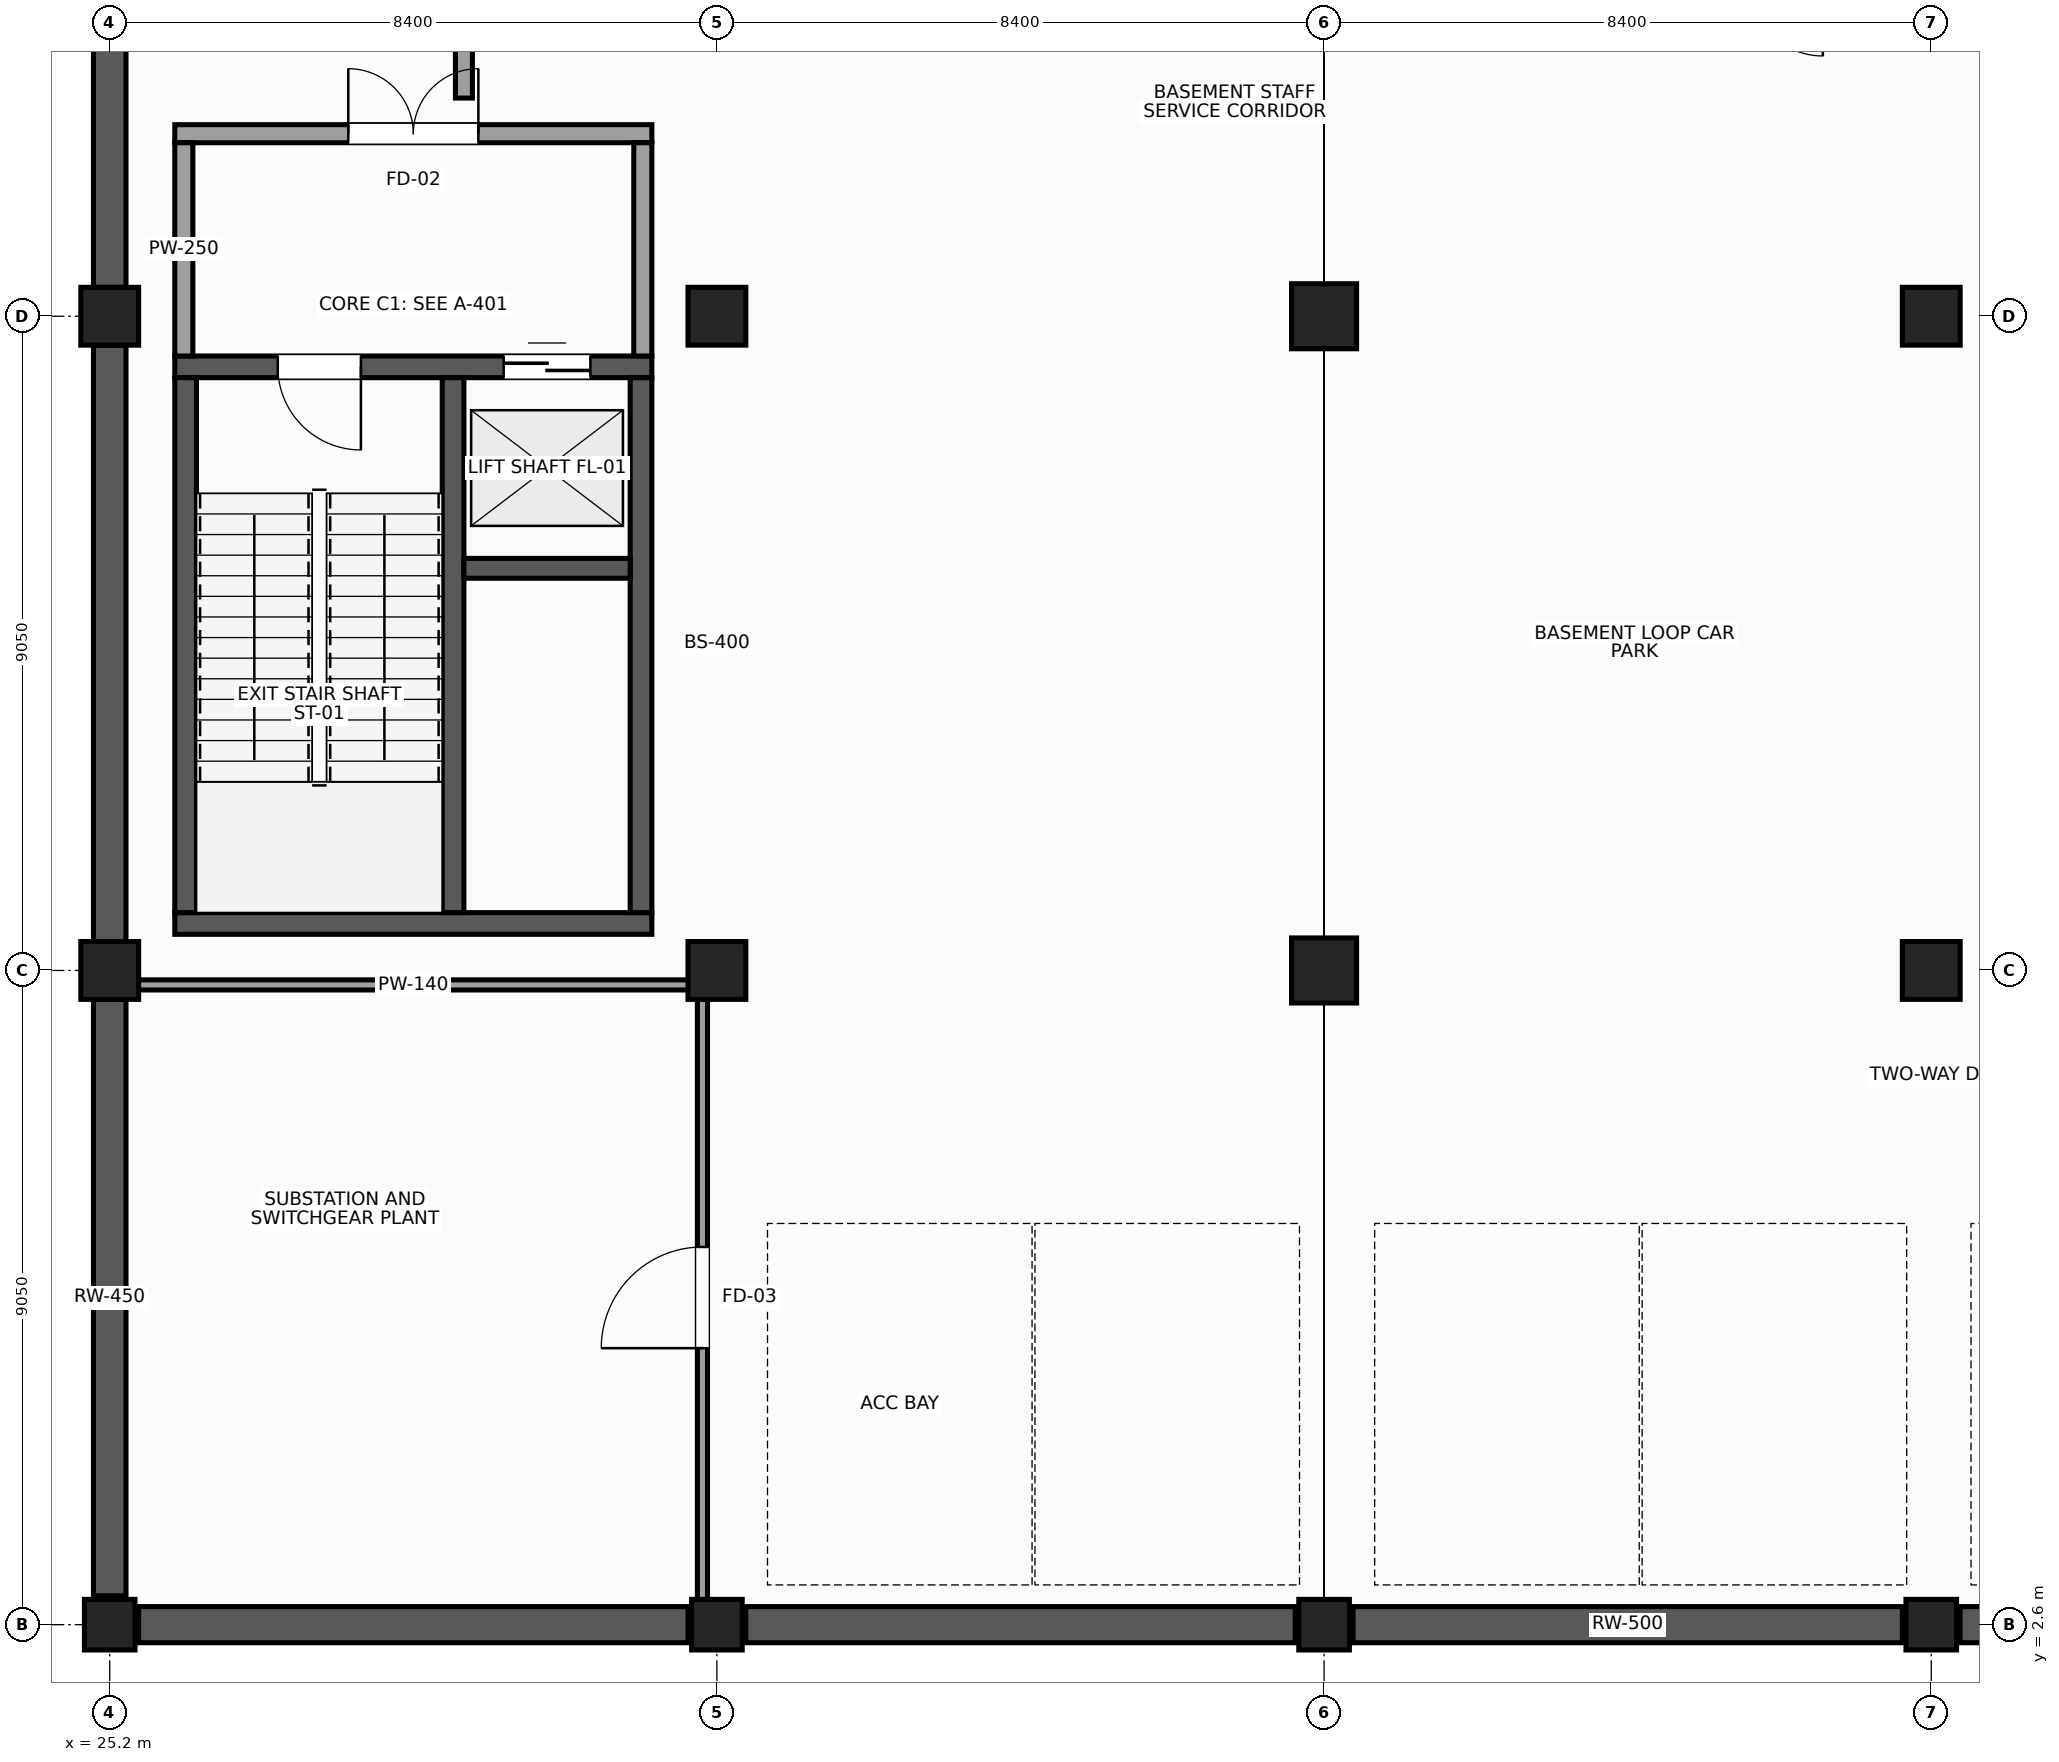
"""IFC4 building model, lengths in metres.
Left out: names, types, materials, properties, quantities, classifications, styles, units other than length and angle.
Written with IfcOpenShell. Run it as: python <this file> out.ifc"""

import sys

from ifc_helpers import new_model, si_unit, direction, frame, frame_2d, origin, origin_2d, place, context, subcontext, project, spatial, rectangle, extrude, element, fill, save


model = new_model("IFC4")
c1 = context("Model", 3, precision=1e-05, world=origin(), true_north=direction((0.0, 1.0)))
c2 = subcontext(c1, "Body", "Model", "MODEL_VIEW")
j1 = project(units=[si_unit("LENGTHUNIT", "METRE"), si_unit("PLANEANGLEUNIT", "RADIAN")], contexts=[c1])
p1 = place(None, origin())
s1 = spatial("IfcSite", under=j1, at=p1, CompositionType="ELEMENT")
p2 = place(p1, origin())
s2 = spatial("IfcBuilding", under=s1, at=p2, CompositionType="ELEMENT")
p3 = place(p2, frame((0.0, 0.0, -5.4)))
s3 = spatial("IfcBuildingStorey", under=s2, at=p3, CompositionType="ELEMENT", Elevation=-5.4)
p4 = place(p3, frame((25.2, 2.6, -0.4), z_axis=(0.0, 0.0, 1.0), x_axis=(1.0, 0.0, 0.0)))
e1 = element("IfcColumn", 1, at=p4, inside=s3, PredefinedType="COLUMN", context=c2, shape_type="SweptSolid", body=[
    extrude(rectangle(XDim=0.7, YDim=0.7, at=origin_2d()), origin(), (0.0, 0.0, 1.0), 5.8),
])
for number, where, z_axis, x_axis in (
    (2, (25.2, 11.65, -0.4), (0.0, 0.0, 1.0), (1.0, 0.0, 0.0)),
    (3, (25.2, 20.7, -0.4), (0.0, 0.0, 1.0), (1.0, 0.0, 0.0)),
):
    element("IfcColumn", number, at=place(p3, frame(where, z_axis=z_axis, x_axis=x_axis)), inside=s3, PredefinedType="COLUMN", context=c2, shape_type="SweptSolid", body=[
        extrude(rectangle(XDim=0.8, YDim=0.8, at=origin_2d()), origin(), (0.0, 0.0, 1.0), 5.8),
    ])
p5 = place(p3, frame((33.6, 2.6, -0.4), z_axis=(0.0, 0.0, 1.0), x_axis=(1.0, 0.0, 0.0)))
e4 = element("IfcColumn", 4, at=p5, inside=s3, PredefinedType="COLUMN", context=c2, shape_type="SweptSolid", body=[
    extrude(rectangle(XDim=0.7, YDim=0.7, at=origin_2d()), origin(), (0.0, 0.0, 1.0), 5.8),
])
for number, where, z_axis, x_axis in (
    (5, (33.6, 11.65, -0.4), (0.0, 0.0, 1.0), (1.0, 0.0, 0.0)),
    (6, (33.6, 20.7, -0.4), (0.0, 0.0, 1.0), (1.0, 0.0, 0.0)),
):
    element("IfcColumn", number, at=place(p3, frame(where, z_axis=z_axis, x_axis=x_axis)), inside=s3, PredefinedType="COLUMN", context=c2, shape_type="SweptSolid", body=[
        extrude(rectangle(XDim=0.8, YDim=0.8, at=origin_2d()), origin(), (0.0, 0.0, 1.0), 5.8),
    ])
p6 = place(p3, frame((42.0, 2.6, -0.4), z_axis=(0.0, 0.0, 1.0), x_axis=(1.0, 0.0, 0.0)))
e7 = element("IfcColumn", 7, at=p6, inside=s3, PredefinedType="COLUMN", context=c2, shape_type="SweptSolid", body=[
    extrude(rectangle(XDim=0.7, YDim=0.7, at=origin_2d()), origin(), (0.0, 0.0, 1.0), 5.8),
])
for number, where, z_axis, x_axis in (
    (8, (42.0, 11.65, -0.4), (0.0, 0.0, 1.0), (1.0, 0.0, 0.0)),
    (9, (42.0, 20.7, -0.4), (0.0, 0.0, 1.0), (1.0, 0.0, 0.0)),
):
    element("IfcColumn", number, at=place(p3, frame(where, z_axis=z_axis, x_axis=x_axis)), inside=s3, PredefinedType="COLUMN", context=c2, shape_type="SweptSolid", body=[
        extrude(rectangle(XDim=0.9, YDim=0.9, at=origin_2d()), origin(), (0.0, 0.0, 1.0), 5.8),
    ])
p7 = place(p3, frame((50.4, 2.6, -0.4), z_axis=(0.0, 0.0, 1.0), x_axis=(1.0, 0.0, 0.0)))
e10 = element("IfcColumn", 10, at=p7, inside=s3, PredefinedType="COLUMN", context=c2, shape_type="SweptSolid", body=[
    extrude(rectangle(XDim=0.7, YDim=0.7, at=origin_2d()), origin(), (0.0, 0.0, 1.0), 5.8),
])
for number, where, z_axis, x_axis in (
    (11, (50.4, 11.65, -0.4), (0.0, 0.0, 1.0), (1.0, 0.0, 0.0)),
    (12, (50.4, 20.7, -0.4), (0.0, 0.0, 1.0), (1.0, 0.0, 0.0)),
):
    element("IfcColumn", number, at=place(p3, frame(where, z_axis=z_axis, x_axis=x_axis)), inside=s3, PredefinedType="COLUMN", context=c2, shape_type="SweptSolid", body=[
        extrude(rectangle(XDim=0.8, YDim=0.8, at=origin_2d()), origin(), (0.0, 0.0, 1.0), 5.8),
    ])
p8 = place(p3, frame((58.4, 2.6, 0.0), z_axis=(0.0, 0.0, 1.0), x_axis=(-1.0, 0.0, 0.0)))
e13 = element("IfcWall", 13, at=p8, inside=s3, PredefinedType="USERDEFINED", context=c2, shape_type="SweptSolid", body=[
    extrude(rectangle(XDim=7.6, YDim=0.5, at=frame_2d((3.8, 0.0))), origin(), (0.0, 0.0, 1.0), 5.08),
])
for number, where, z_axis, x_axis in (
    (14, (50.0, 2.6, 0.0), (0.0, 0.0, 1.0), (-1.0, 0.0, 0.0)),
    (15, (41.6, 2.6, 0.0), (0.0, 0.0, 1.0), (-1.0, 0.0, 0.0)),
):
    element("IfcWall", number, at=place(p3, frame(where, z_axis=z_axis, x_axis=x_axis)), inside=s3, PredefinedType="USERDEFINED", context=c2, shape_type="SweptSolid", body=[
        extrude(rectangle(XDim=7.6, YDim=0.5, at=frame_2d((3.8, 0.0))), origin(), (0.0, 0.0, 1.0), 5.08),
    ])
p9 = place(p3, frame((33.2, 2.6, 0.0), z_axis=(0.0, 0.0, 1.0), x_axis=(-1.0, 0.0, 0.0)))
e16 = element("IfcWall", 16, at=p9, inside=s3, PredefinedType="USERDEFINED", context=c2, shape_type="SweptSolid", body=[
    extrude(rectangle(XDim=7.6, YDim=0.5, at=frame_2d((3.8, 0.0))), origin(), (0.0, 0.0, 1.0), 5.08),
])
for number, where, z_axis, x_axis in (
    (17, (25.2, 3.0, 0.0), (0.0, 0.0, 1.0), (0.0, 1.0, 0.0)),
    (18, (25.2, 12.05, 0.0), (0.0, 0.0, 1.0), (0.0, 1.0, 0.0)),
    (19, (25.2, 21.1, 0.0), (0.0, 0.0, 1.0), (0.0, 1.0, 0.0)),
):
    element("IfcWall", number, at=place(p3, frame(where, z_axis=z_axis, x_axis=x_axis)), inside=s3, PredefinedType="USERDEFINED", context=c2, shape_type="SweptSolid", body=[
        extrude(rectangle(XDim=8.25, YDim=0.45, at=frame_2d((4.125, 0.0))), origin(), (0.0, 0.0, 1.0), 5.08),
    ])
p10 = place(p3, frame((26.1, 12.3, 0.0), z_axis=(0.0, 0.0, 1.0), x_axis=(1.0, 0.0, 0.0)))
e20 = element("IfcWall", 20, at=p10, inside=s3, PredefinedType="SHEAR", context=c2, shape_type="SweptSolid", body=[
    extrude(rectangle(XDim=6.6, YDim=0.3, at=frame_2d((3.3, 0.0))), origin(), (0.0, 0.0, 1.0), 5.08),
])
p11 = place(p3, frame((26.1, 20.0, 0.0), z_axis=(0.0, 0.0, 1.0), x_axis=(1.0, 0.0, 0.0)))
e21 = element("IfcWall", 21, at=p11, inside=s3, PredefinedType="SHEAR", context=c2, shape_type="SweptSolid", body=[
    extrude(rectangle(XDim=6.6, YDim=0.3, at=frame_2d((3.3, 0.0))), origin(), (0.0, 0.0, 1.0), 5.08),
])
p12 = place(p11, frame((1.425, 0.0, 0.0)))
e22 = element("IfcOpeningElement", 22, at=p12, cuts=e21, PredefinedType="OPENING", context=c2, shape_type="SweptSolid", body=[
    extrude(rectangle(XDim=1.15, YDim=2.2, at=frame_2d((0.575, 1.1))), frame((0.0, 0.16, 0.0), z_axis=(0.0, -1.0, 0.0), x_axis=(1.0, 0.0, 0.0)), (0.0, 0.0, 1.0), 0.32),
])
p13 = place(p11, frame((4.55, 0.0, 0.0)))
e23 = element("IfcOpeningElement", 23, at=p13, cuts=e21, PredefinedType="OPENING", context=c2, shape_type="SweptSolid", body=[
    extrude(rectangle(XDim=1.2, YDim=2.15, at=frame_2d((0.6, 1.075))), frame((0.0, 0.16, 0.0), z_axis=(0.0, -1.0, 0.0), x_axis=(1.0, 0.0, 0.0)), (0.0, 0.0, 1.0), 0.32),
])
for number, where, z_axis, x_axis in (
    (24, (26.25, 12.45, 0.0), (0.0, 0.0, 1.0), (0.0, 1.0, 0.0)),
    (25, (32.55, 12.45, 0.0), (0.0, 0.0, 1.0), (0.0, 1.0, 0.0)),
    (26, (29.95, 12.45, 0.0), (0.0, 0.0, 1.0), (0.0, 1.0, 0.0)),
):
    element("IfcWall", number, at=place(p3, frame(where, z_axis=z_axis, x_axis=x_axis)), inside=s3, PredefinedType="SHEAR", context=c2, shape_type="SweptSolid", body=[
        extrude(rectangle(XDim=7.4, YDim=0.3, at=frame_2d((3.7, 0.0))), origin(), (0.0, 0.0, 1.0), 5.08),
    ])
p14 = place(p3, frame((30.1, 17.213, 0.0), z_axis=(0.0, 0.0, 1.0), x_axis=(1.0, 0.0, 0.0)))
e27 = element("IfcWall", 27, at=p14, inside=s3, PredefinedType="SHEAR", context=c2, shape_type="SweptSolid", body=[
    extrude(rectangle(XDim=2.3, YDim=0.275, at=frame_2d((1.15, 0.0))), origin(), (0.0, 0.0, 1.0), 5.08),
])
p15 = place(p3, frame((26.1, 23.225, 0.0), z_axis=(0.0, 0.0, 1.0), x_axis=(1.0, 0.0, 0.0)))
e28 = element("IfcWall", 28, at=p15, inside=s3, PredefinedType="PARTITIONING", context=c2, shape_type="SweptSolid", body=[
    extrude(rectangle(XDim=6.6, YDim=0.25, at=frame_2d((3.3, 0.0))), origin(), (0.0, 0.0, 1.0), 5.08),
])
p16 = place(p15, frame((2.4, 0.0, 0.0)))
e29 = element("IfcOpeningElement", 29, at=p16, cuts=e28, PredefinedType="OPENING", context=c2, shape_type="SweptSolid", body=[
    extrude(rectangle(XDim=1.8, YDim=2.25, at=frame_2d((0.9, 1.125))), frame((0.0, 0.135, 0.0), z_axis=(0.0, -1.0, 0.0), x_axis=(1.0, 0.0, 0.0)), (0.0, 0.0, 1.0), 0.27),
])
for number, where, z_axis, x_axis in (
    (30, (26.225, 20.15, 0.0), (0.0, 0.0, 1.0), (0.0, 1.0, 0.0)),
    (31, (32.575, 20.15, 0.0), (0.0, 0.0, 1.0), (0.0, 1.0, 0.0)),
):
    element("IfcWall", number, at=place(p3, frame(where, z_axis=z_axis, x_axis=x_axis)), inside=s3, PredefinedType="PARTITIONING", context=c2, shape_type="SweptSolid", body=[
        extrude(rectangle(XDim=2.95, YDim=0.25, at=frame_2d((1.475, 0.0))), origin(), (0.0, 0.0, 1.0), 4.23),
    ])
p17 = place(p3, frame((33.4, 2.87, 0.0), z_axis=(0.0, 0.0, 1.0), x_axis=(0.0, 1.0, 0.0)))
e32 = element("IfcWall", 32, at=p17, inside=s3, PredefinedType="PARTITIONING", context=c2, shape_type="SweptSolid", body=[
    extrude(rectangle(XDim=8.51, YDim=0.14, at=frame_2d((4.255, 0.0))), origin(), (0.0, 0.0, 1.0), 4.13),
])
p18 = place(p17, frame((3.555, 0.0, 0.0)))
e33 = element("IfcOpeningElement", 33, at=p18, cuts=e32, PredefinedType="OPENING", context=c2, shape_type="SweptSolid", body=[
    extrude(rectangle(XDim=1.4, YDim=2.25, at=frame_2d((0.7, 1.125))), frame((0.0, 0.08, 0.0), z_axis=(0.0, -1.0, 0.0), x_axis=(1.0, 0.0, 0.0)), (0.0, 0.0, 1.0), 0.16),
])
p19 = place(p3, frame((25.33, 11.45, 0.0), z_axis=(0.0, 0.0, 1.0), x_axis=(1.0, 0.0, 0.0)))
e34 = element("IfcWall", 34, at=p19, inside=s3, PredefinedType="PARTITIONING", context=c2, shape_type="SweptSolid", body=[
    extrude(rectangle(XDim=8.14, YDim=0.14, at=frame_2d((4.07, 0.0))), origin(), (0.0, 0.0, 1.0), 4.13),
])
p20 = place(p3, frame((30.1, 23.718, 0.0), z_axis=(0.0, 0.0, 1.0), x_axis=(0.0, 1.0, 0.0)))
e35 = element("IfcWall", 35, at=p20, inside=s3, PredefinedType="PARTITIONING", context=c2, shape_type="SweptSolid", body=[
    extrude(rectangle(XDim=5.314, YDim=0.235, at=frame_2d((2.657, 0.0))), origin(), (0.0, 0.0, 1.0), 4.53),
])
p21 = place(p20, frame((1.957, 0.0, 0.0)))
e36 = element("IfcOpeningElement", 36, at=p21, cuts=e35, PredefinedType="OPENING", context=c2, shape_type="SweptSolid", body=[
    extrude(rectangle(XDim=1.4, YDim=2.25, at=frame_2d((0.7, 1.125))), frame((0.0, 0.127, 0.0), z_axis=(0.0, -1.0, 0.0), x_axis=(1.0, 0.0, 0.0)), (0.0, 0.0, 1.0), 0.255),
])
p22 = place(p12, frame((1.15, 0.0, 0.0), z_axis=(0.0, 0.0, 1.0), x_axis=(-1.0, 0.0, 0.0)))
e37 = element("IfcDoor", 37, at=p22, inside=s3, OperationType="SINGLE_SWING_LEFT", PredefinedType="DOOR", context=c2, shape_type="SweptSolid", body=[
    extrude(rectangle(XDim=1.15, YDim=2.2, at=frame_2d((0.575, 1.1))), frame((0.0, 0.025, 0.0), z_axis=(0.0, -1.0, 0.0), x_axis=(1.0, 0.0, 0.0)), (0.0, 0.0, 1.0), 0.05),
])
fill(e22, e37)
p23 = place(p13, origin())
e38 = element("IfcDoor", 38, at=p23, inside=s3, OperationType="DOUBLE_DOOR_SLIDING", PredefinedType="DOOR", context=c2, shape_type="SweptSolid", body=[
    extrude(rectangle(XDim=1.2, YDim=2.15, at=frame_2d((0.6, 1.075))), frame((0.0, 0.025, 0.0), z_axis=(0.0, -1.0, 0.0), x_axis=(1.0, 0.0, 0.0)), (0.0, 0.0, 1.0), 0.05),
])
fill(e23, e38)
p24 = place(p16, origin())
e39 = element("IfcDoor", 39, at=p24, inside=s3, OperationType="DOUBLE_DOOR_SINGLE_SWING", PredefinedType="DOOR", context=c2, shape_type="SweptSolid", body=[
    extrude(rectangle(XDim=1.8, YDim=2.25, at=frame_2d((0.9, 1.125))), frame((0.0, 0.025, 0.0), z_axis=(0.0, -1.0, 0.0), x_axis=(1.0, 0.0, 0.0)), (0.0, 0.0, 1.0), 0.05),
])
fill(e29, e39)
p25 = place(p18, origin())
e40 = element("IfcDoor", 40, at=p25, inside=s3, OperationType="SINGLE_SWING_LEFT", PredefinedType="DOOR", context=c2, shape_type="SweptSolid", body=[
    extrude(rectangle(XDim=1.4, YDim=2.25, at=frame_2d((0.7, 1.125))), frame((0.0, 0.025, 0.0), z_axis=(0.0, -1.0, 0.0), x_axis=(1.0, 0.0, 0.0)), (0.0, 0.0, 1.0), 0.05),
])
fill(e33, e40)
save(model, sys.argv[1])
